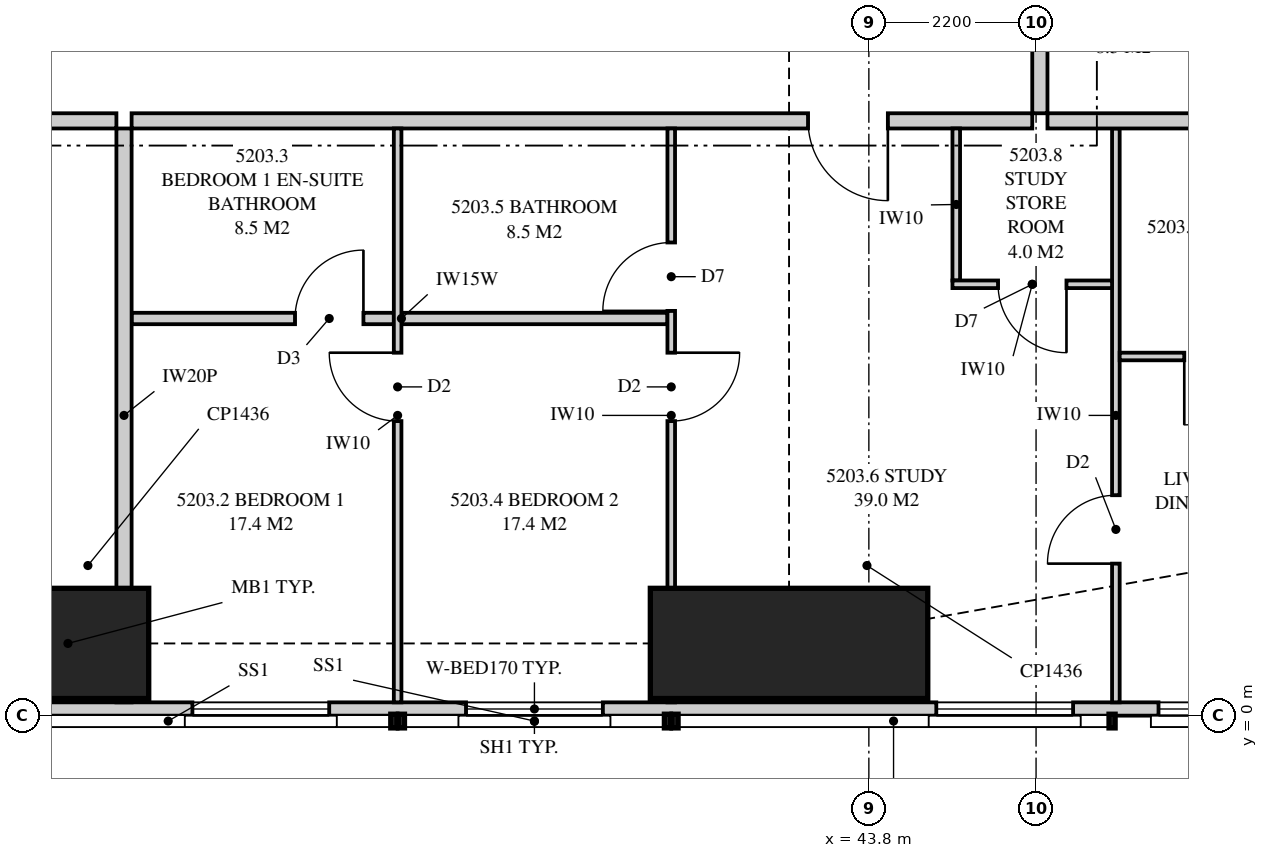
"""IFC4 building model, lengths in metres.
Left out: names, types, materials, properties, quantities, classifications, styles, units other than length and angle.
Written with IfcOpenShell. Run it as: python <this file> out.ifc"""

import sys

from ifc_helpers import new_model, si_unit, direction, frame, frame_2d, origin, origin_2d, place, context, subcontext, project, spatial, polyline, rectangle, outline, extrude, element, fill, save


model = new_model("IFC4")
c1 = context("Model", 3, precision=1e-05, world=origin(), true_north=direction((0.0, 1.0)))
c2 = subcontext(c1, "Body", "Model", "MODEL_VIEW")
j1 = project(units=[si_unit("LENGTHUNIT", "METRE"), si_unit("PLANEANGLEUNIT", "RADIAN")], contexts=[c1])
p1 = place(None, origin())
s1 = spatial("IfcSite", under=j1, at=p1, CompositionType="ELEMENT")
p2 = place(p1, origin())
s2 = spatial("IfcBuilding", under=s1, at=p2, CompositionType="ELEMENT")
p3 = place(p2, frame((0.0, 0.0, 191.2)))
s3 = spatial("IfcBuildingStorey", under=s2, at=p3, CompositionType="ELEMENT", Elevation=191.2)
for number, where, z_axis, x_axis in (
    (1, (32.5, 0.95, 0.0), (0.0, 0.0, 1.0), (0.0, 1.0, 0.0)),
    (2, (42.75, 0.95, 0.0), (0.0, 0.0, 1.0), (0.0, 1.0, 0.0)),
):
    element("IfcColumn", number, at=place(p3, frame(where, z_axis=z_axis, x_axis=x_axis)), inside=s3, PredefinedType="COLUMN", context=c2, shape_type="SweptSolid", body=[
        extrude(rectangle(XDim=1.45, YDim=3.65, at=origin_2d()), origin(), (0.0, 0.0, 1.0), 3.35),
    ])
p4 = place(p3, frame((15.051, 0.087, 0.0), z_axis=(0.0, 0.0, 1.0), x_axis=(1.0, 0.0, 0.0)))
e3 = element("IfcWall", 3, at=p4, inside=s3, PredefinedType="SOLIDWALL", context=c2, shape_type="SweptSolid", body=[
    extrude(outline(polyline([(0.0, 0.0), (34.897, 0.0), (34.897, 3.11), (27.91, 3.11), (27.91, 2.15), (27.836, 2.15), (27.836, 3.11), (27.699, 3.11), (27.699, 2.15), (7.199, 2.15), (7.199, 3.11), (7.062, 3.11), (7.062, 2.15), (6.987, 2.15), (6.987, 3.11), (0.0, 3.11), (0.0, 0.0)])), frame((0.0, 0.087, 0.0), z_axis=(0.0, -1.0, 0.0), x_axis=(1.0, 0.0, 0.0)), (0.0, 0.0, 1.0), 0.175),
])
p5 = place(p4, frame((2.84, 0.0, 0.4)))
e4 = element("IfcOpeningElement", 4, at=p5, cuts=e3, PredefinedType="OPENING", context=c2, shape_type="SweptSolid", body=[
    extrude(rectangle(XDim=2.4, YDim=1.7, at=frame_2d((1.2, 0.85))), frame((0.0, 0.097, 0.0), z_axis=(0.0, -1.0, 0.0), x_axis=(1.0, 0.0, 0.0)), (0.0, 0.0, 1.0), 0.195),
])
p6 = place(p4, frame((9.149, 0.0, 0.4)))
e5 = element("IfcOpeningElement", 5, at=p6, cuts=e3, PredefinedType="OPENING", context=c2, shape_type="SweptSolid", body=[
    extrude(rectangle(XDim=1.8, YDim=1.7, at=frame_2d((0.9, 0.85))), frame((0.0, 0.097, 0.0), z_axis=(0.0, -1.0, 0.0), x_axis=(1.0, 0.0, 0.0)), (0.0, 0.0, 1.0), 0.195),
])
p7 = place(p4, frame((13.561, 0.0, 0.0)))
e6 = element("IfcOpeningElement", 6, at=p7, cuts=e3, PredefinedType="OPENING", context=c2, shape_type="SweptSolid", body=[
    extrude(rectangle(XDim=1.8, YDim=2.1, at=frame_2d((0.9, 1.05))), frame((0.0, 0.097, 0.0), z_axis=(0.0, -1.0, 0.0), x_axis=(1.0, 0.0, 0.0)), (0.0, 0.0, 1.0), 0.195),
])
p8 = place(p4, frame((19.849, 0.0, 0.4)))
e7 = element("IfcOpeningElement", 7, at=p8, cuts=e3, PredefinedType="OPENING", context=c2, shape_type="SweptSolid", body=[
    extrude(rectangle(XDim=1.8, YDim=1.7, at=frame_2d((0.9, 0.85))), frame((0.0, 0.097, 0.0), z_axis=(0.0, -1.0, 0.0), x_axis=(1.0, 0.0, 0.0)), (0.0, 0.0, 1.0), 0.195),
])
p9 = place(p4, frame((23.449, 0.0, 0.4)))
e8 = element("IfcOpeningElement", 8, at=p9, cuts=e3, PredefinedType="OPENING", context=c2, shape_type="SweptSolid", body=[
    extrude(rectangle(XDim=1.8, YDim=1.7, at=frame_2d((0.9, 0.85))), frame((0.0, 0.097, 0.0), z_axis=(0.0, -1.0, 0.0), x_axis=(1.0, 0.0, 0.0)), (0.0, 0.0, 1.0), 0.195),
])
p10 = place(p4, frame((29.636, 0.0, 0.4)))
e9 = element("IfcOpeningElement", 9, at=p10, cuts=e3, PredefinedType="OPENING", context=c2, shape_type="SweptSolid", body=[
    extrude(rectangle(XDim=1.8, YDim=1.7, at=frame_2d((0.9, 0.85))), frame((0.0, 0.097, 0.0), z_axis=(0.0, -1.0, 0.0), x_axis=(1.0, 0.0, 0.0)), (0.0, 0.0, 1.0), 0.195),
])
p11 = place(p4, frame((32.56, 0.0, 0.4)))
e10 = element("IfcOpeningElement", 10, at=p11, cuts=e3, PredefinedType="OPENING", context=c2, shape_type="SweptSolid", body=[
    extrude(rectangle(XDim=1.8, YDim=1.7, at=frame_2d((0.9, 0.85))), frame((0.0, 0.097, 0.0), z_axis=(0.0, -1.0, 0.0), x_axis=(1.0, 0.0, 0.0)), (0.0, 0.0, 1.0), 0.195),
])
p12 = place(p3, frame((34.0, 0.175, 0.0), z_axis=(0.0, 0.0, 1.0), x_axis=(0.0, 1.0, 0.0)))
e11 = element("IfcWall", 11, at=p12, inside=s3, PredefinedType="PARTITIONING", context=c2, shape_type="SweptSolid", body=[
    extrude(outline(polyline([(0.0, 0.0), (7.55, 0.0), (7.55, 3.11), (1.685, 3.11), (1.685, 2.15), (0.0, 2.15), (0.0, 3.11), (0.0, 0.0)])), frame((0.0, 0.1, 0.0), z_axis=(0.0, -1.0, 0.0), x_axis=(1.0, 0.0, 0.0)), (0.0, 0.0, 1.0), 0.2),
])
p13 = place(p3, frame((34.1, 7.825, 0.0), z_axis=(0.0, 0.0, 1.0), x_axis=(1.0, 0.0, 0.0)))
e12 = element("IfcWall", 12, at=p13, inside=s3, PredefinedType="PARTITIONING", context=c2, shape_type="SweptSolid", body=[
    extrude(outline(polyline([(0.0, 0.0), (11.85, 0.0), (11.85, 3.11), (8.987, 3.11), (8.987, 2.541), (8.312, 2.541), (8.312, 3.11), (0.0, 3.11), (0.0, 0.0)])), frame((0.0, 0.1, 0.0), z_axis=(0.0, -1.0, 0.0), x_axis=(1.0, 0.0, 0.0)), (0.0, 0.0, 1.0), 0.2),
])
p14 = place(p13, frame((8.9, 0.0, 0.0)))
e13 = element("IfcOpeningElement", 13, at=p14, cuts=e12, PredefinedType="OPENING", context=c2, shape_type="SweptSolid", body=[
    extrude(rectangle(XDim=1.05, YDim=2.2, at=frame_2d((0.525, 1.1))), frame((0.0, 0.11, 0.0), z_axis=(0.0, -1.0, 0.0), x_axis=(1.0, 0.0, 0.0)), (0.0, 0.0, 1.0), 0.22),
])
p15 = place(p3, frame((37.6, 0.175, 0.0), z_axis=(0.0, 0.0, 1.0), x_axis=(0.0, 1.0, 0.0)))
e14 = element("IfcWall", 14, at=p15, inside=s3, PredefinedType="PARTITIONING", context=c2, shape_type="SweptSolid", body=[
    extrude(outline(polyline([(0.0, 0.0), (7.55, 0.0), (7.55, 3.11), (1.635, 3.11), (1.635, 2.15), (0.0, 2.15), (0.0, 3.11), (0.0, 0.0)])), frame((0.0, 0.05, 0.0), z_axis=(0.0, -1.0, 0.0), x_axis=(1.0, 0.0, 0.0)), (0.0, 0.0, 1.0), 0.1),
])
p16 = place(p15, frame((3.7, 0.0, 0.0)))
e15 = element("IfcOpeningElement", 15, at=p16, cuts=e14, PredefinedType="OPENING", context=c2, shape_type="SweptSolid", body=[
    extrude(rectangle(XDim=0.9, YDim=2.1, at=frame_2d((0.45, 1.05))), frame((0.0, 0.06, 0.0), z_axis=(0.0, -1.0, 0.0), x_axis=(1.0, 0.0, 0.0)), (0.0, 0.0, 1.0), 0.12),
])
p17 = place(p3, frame((41.2, 0.175, 0.0), z_axis=(0.0, 0.0, 1.0), x_axis=(0.0, 1.0, 0.0)))
e16 = element("IfcWall", 16, at=p17, inside=s3, PredefinedType="PARTITIONING", context=c2, shape_type="SweptSolid", body=[
    extrude(outline(polyline([(0.0, 0.0), (7.55, 0.0), (7.55, 3.11), (1.635, 3.11), (1.635, 2.15), (0.0, 2.15), (0.0, 3.11), (0.0, 0.0)])), frame((0.0, 0.05, 0.0), z_axis=(0.0, -1.0, 0.0), x_axis=(1.0, 0.0, 0.0)), (0.0, 0.0, 1.0), 0.1),
])
p18 = place(p17, frame((3.7, 0.0, 0.0)))
e17 = element("IfcOpeningElement", 17, at=p18, cuts=e16, PredefinedType="OPENING", context=c2, shape_type="SweptSolid", body=[
    extrude(rectangle(XDim=0.9, YDim=2.1, at=frame_2d((0.45, 1.05))), frame((0.0, 0.06, 0.0), z_axis=(0.0, -1.0, 0.0), x_axis=(1.0, 0.0, 0.0)), (0.0, 0.0, 1.0), 0.12),
])
p19 = place(p17, frame((5.15, 0.0, 0.0)))
e18 = element("IfcOpeningElement", 18, at=p19, cuts=e16, PredefinedType="OPENING", context=c2, shape_type="SweptSolid", body=[
    extrude(rectangle(XDim=0.9, YDim=2.1, at=frame_2d((0.45, 1.05))), frame((0.0, 0.06, 0.0), z_axis=(0.0, -1.0, 0.0), x_axis=(1.0, 0.0, 0.0)), (0.0, 0.0, 1.0), 0.12),
])
p20 = place(p3, frame((34.1, 5.225, 0.0), z_axis=(0.0, 0.0, 1.0), x_axis=(1.0, 0.0, 0.0)))
e19 = element("IfcWall", 19, at=p20, inside=s3, PredefinedType="PLUMBINGWALL", context=c2, shape_type="SweptSolid", body=[
    extrude(rectangle(XDim=3.45, YDim=0.15, at=frame_2d((1.725, 0.0))), origin(), (0.0, 0.0, 1.0), 3.11),
])
p21 = place(p20, frame((2.15, 0.0, 0.0)))
e20 = element("IfcOpeningElement", 20, at=p21, cuts=e19, PredefinedType="OPENING", context=c2, shape_type="SweptSolid", body=[
    extrude(rectangle(XDim=0.9, YDim=2.1, at=frame_2d((0.45, 1.05))), frame((0.0, 0.085, 0.0), z_axis=(0.0, -1.0, 0.0), x_axis=(1.0, 0.0, 0.0)), (0.0, 0.0, 1.0), 0.17),
])
p22 = place(p3, frame((37.65, 5.225, 0.0), z_axis=(0.0, 0.0, 1.0), x_axis=(1.0, 0.0, 0.0)))
e21 = element("IfcWall", 21, at=p22, inside=s3, PredefinedType="PLUMBINGWALL", context=c2, shape_type="SweptSolid", body=[
    extrude(rectangle(XDim=3.5, YDim=0.15, at=frame_2d((1.75, 0.0))), origin(), (0.0, 0.0, 1.0), 3.11),
])
p23 = place(p3, frame((47.05, 0.175, 0.0), z_axis=(0.0, 0.0, 1.0), x_axis=(0.0, 1.0, 0.0)))
e22 = element("IfcWall", 22, at=p23, inside=s3, PredefinedType="PARTITIONING", context=c2, shape_type="SweptSolid", body=[
    extrude(outline(polyline([(0.0, 0.0), (7.55, 0.0), (7.55, 3.11), (2.409, 3.11), (2.409, 2.15), (0.663, 2.15), (0.663, 3.11), (0.0, 3.11), (0.0, 0.0)])), frame((0.0, 0.05, 0.0), z_axis=(0.0, -1.0, 0.0), x_axis=(1.0, 0.0, 0.0)), (0.0, 0.0, 1.0), 0.1),
])
p24 = place(p23, frame((1.825, 0.0, 0.0)))
e23 = element("IfcOpeningElement", 23, at=p24, cuts=e22, PredefinedType="OPENING", context=c2, shape_type="SweptSolid", body=[
    extrude(rectangle(XDim=0.9, YDim=2.1, at=frame_2d((0.45, 1.05))), frame((0.0, 0.06, 0.0), z_axis=(0.0, -1.0, 0.0), x_axis=(1.0, 0.0, 0.0)), (0.0, 0.0, 1.0), 0.12),
])
p25 = place(p3, frame((47.1, 4.725, 0.0), z_axis=(0.0, 0.0, 1.0), x_axis=(1.0, 0.0, 0.0)))
e24 = element("IfcWall", 24, at=p25, inside=s3, PredefinedType="PARTITIONING", context=c2, shape_type="SweptSolid", body=[
    extrude(rectangle(XDim=2.6, YDim=0.1, at=frame_2d((1.3, 0.0))), origin(), (0.0, 0.0, 1.0), 3.11),
])
p26 = place(p25, frame((0.85, 0.0, 0.0)))
e25 = element("IfcOpeningElement", 25, at=p26, cuts=e24, PredefinedType="OPENING", context=c2, shape_type="SweptSolid", body=[
    extrude(rectangle(XDim=0.9, YDim=2.1, at=frame_2d((0.45, 1.05))), frame((0.0, 0.06, 0.0), z_axis=(0.0, -1.0, 0.0), x_axis=(1.0, 0.0, 0.0)), (0.0, 0.0, 1.0), 0.12),
])
p27 = place(p3, frame((46.15, 7.825, 0.0), z_axis=(0.0, 0.0, 1.0), x_axis=(1.0, 0.0, 0.0)))
e26 = element("IfcWall", 26, at=p27, inside=s3, PredefinedType="PARTITIONING", context=c2, shape_type="SweptSolid", body=[
    extrude(outline(polyline([(0.0, 0.0), (6.85, 0.0), (6.85, 3.11), (6.138, 3.11), (6.138, 2.15), (4.303, 2.15), (4.303, 3.11), (0.0, 3.11), (0.0, 0.0)])), frame((0.0, 0.1, 0.0), z_axis=(0.0, -1.0, 0.0), x_axis=(1.0, 0.0, 0.0)), (0.0, 0.0, 1.0), 0.2),
])
p28 = place(p3, frame((46.05, 7.925, 0.0), z_axis=(0.0, 0.0, 1.0), x_axis=(0.0, 1.0, 0.0)))
e27 = element("IfcWall", 27, at=p28, inside=s3, PredefinedType="PARTITIONING", context=c2, shape_type="SweptSolid", body=[
    extrude(outline(polyline([(0.0, 0.0), (13.775, 0.0), (13.775, 3.11), (5.412, 3.11), (5.412, 2.541), (4.738, 2.541), (4.738, 3.11), (0.0, 3.11), (0.0, 0.0)])), frame((0.0, 0.1, 0.0), z_axis=(0.0, -1.0, 0.0), x_axis=(1.0, 0.0, 0.0)), (0.0, 0.0, 1.0), 0.2),
])
p29 = place(p28, frame((6.387, 0.0, 0.0)))
e28 = element("IfcOpeningElement", 28, at=p29, cuts=e27, PredefinedType="OPENING", context=c2, shape_type="SweptSolid", body=[
    extrude(rectangle(XDim=1.05, YDim=2.2, at=frame_2d((0.525, 1.1))), frame((0.0, 0.11, 0.0), z_axis=(0.0, -1.0, 0.0), x_axis=(1.0, 0.0, 0.0)), (0.0, 0.0, 1.0), 0.22),
])
p30 = place(p3, frame((30.05, 7.825, 0.0), z_axis=(0.0, 0.0, 1.0), x_axis=(1.0, 0.0, 0.0)))
e29 = element("IfcWall", 29, at=p30, inside=s3, PredefinedType="PARTITIONING", context=c2, shape_type="SweptSolid", body=[
    extrude(outline(polyline([(0.0, 0.0), (3.85, 0.0), (3.85, 3.11), (2.787, 3.11), (2.787, 2.541), (2.113, 2.541), (2.113, 3.11), (0.0, 3.11), (0.0, 0.0)])), frame((0.0, 0.1, 0.0), z_axis=(0.0, -1.0, 0.0), x_axis=(1.0, 0.0, 0.0)), (0.0, 0.0, 1.0), 0.2),
])
p31 = place(p3, frame((47.0, 5.675, 0.0), z_axis=(0.0, 0.0, 1.0), x_axis=(-1.0, 0.0, 0.0)))
e30 = element("IfcWall", 30, at=p31, inside=s3, PredefinedType="PARTITIONING", context=c2, shape_type="SweptSolid", body=[
    extrude(rectangle(XDim=2.1, YDim=0.1, at=frame_2d((1.05, 0.0))), origin(), (0.0, 0.0, 1.0), 3.11),
])
p32 = place(p31, frame((0.6, 0.0, 0.0)))
e31 = element("IfcOpeningElement", 31, at=p32, cuts=e30, PredefinedType="OPENING", context=c2, shape_type="SweptSolid", body=[
    extrude(rectangle(XDim=0.9, YDim=2.1, at=frame_2d((0.45, 1.05))), frame((0.0, 0.06, 0.0), z_axis=(0.0, -1.0, 0.0), x_axis=(1.0, 0.0, 0.0)), (0.0, 0.0, 1.0), 0.12),
])
p33 = place(p3, frame((44.95, 7.725, 0.0), z_axis=(0.0, 0.0, 1.0), x_axis=(0.0, -1.0, 0.0)))
e32 = element("IfcWall", 32, at=p33, inside=s3, PredefinedType="PARTITIONING", context=c2, shape_type="SweptSolid", body=[
    extrude(rectangle(XDim=2.0, YDim=0.1, at=frame_2d((1.0, 0.0))), origin(), (0.0, 0.0, 1.0), 3.11),
])
p34 = place(p8, origin())
e33 = element("IfcWindow", 33, at=p34, inside=s3, PartitioningType="SINGLE_PANEL", PredefinedType="WINDOW", context=c2, shape_type="SweptSolid", body=[
    extrude(rectangle(XDim=1.8, YDim=1.7, at=frame_2d((0.9, 0.85))), frame((0.0, 0.03, 0.0), z_axis=(0.0, -1.0, 0.0), x_axis=(1.0, 0.0, 0.0)), (0.0, 0.0, 1.0), 0.06),
])
fill(e7, e33)
p35 = place(p9, origin())
e34 = element("IfcWindow", 34, at=p35, inside=s3, PartitioningType="SINGLE_PANEL", PredefinedType="WINDOW", context=c2, shape_type="SweptSolid", body=[
    extrude(rectangle(XDim=1.8, YDim=1.7, at=frame_2d((0.9, 0.85))), frame((0.0, 0.03, 0.0), z_axis=(0.0, -1.0, 0.0), x_axis=(1.0, 0.0, 0.0)), (0.0, 0.0, 1.0), 0.06),
])
fill(e8, e34)
p36 = place(p10, origin())
e35 = element("IfcWindow", 35, at=p36, inside=s3, PartitioningType="SINGLE_PANEL", PredefinedType="WINDOW", context=c2, shape_type="SweptSolid", body=[
    extrude(rectangle(XDim=1.8, YDim=1.7, at=frame_2d((0.9, 0.85))), frame((0.0, 0.03, 0.0), z_axis=(0.0, -1.0, 0.0), x_axis=(1.0, 0.0, 0.0)), (0.0, 0.0, 1.0), 0.06),
])
fill(e9, e35)
p37 = place(p11, origin())
e36 = element("IfcWindow", 36, at=p37, inside=s3, PartitioningType="SINGLE_PANEL", PredefinedType="WINDOW", context=c2, shape_type="SweptSolid", body=[
    extrude(rectangle(XDim=1.8, YDim=1.7, at=frame_2d((0.9, 0.85))), frame((0.0, 0.03, 0.0), z_axis=(0.0, -1.0, 0.0), x_axis=(1.0, 0.0, 0.0)), (0.0, 0.0, 1.0), 0.06),
])
fill(e10, e36)
p38 = place(p14, frame((1.05, 0.0, 0.0), z_axis=(0.0, 0.0, 1.0), x_axis=(-1.0, 0.0, 0.0)))
e37 = element("IfcDoor", 37, at=p38, inside=s3, OperationType="SINGLE_SWING_LEFT", PredefinedType="DOOR", context=c2, shape_type="SweptSolid", body=[
    extrude(rectangle(XDim=1.05, YDim=2.2, at=frame_2d((0.525, 1.1))), frame((0.0, 0.025, 0.0), z_axis=(0.0, -1.0, 0.0), x_axis=(1.0, 0.0, 0.0)), (0.0, 0.0, 1.0), 0.05),
])
fill(e13, e37)
p39 = place(p16, origin())
e38 = element("IfcDoor", 38, at=p39, inside=s3, OperationType="SINGLE_SWING_RIGHT", PredefinedType="DOOR", context=c2, shape_type="SweptSolid", body=[
    extrude(rectangle(XDim=0.9, YDim=2.1, at=frame_2d((0.45, 1.05))), frame((0.0, 0.025, 0.0), z_axis=(0.0, -1.0, 0.0), x_axis=(1.0, 0.0, 0.0)), (0.0, 0.0, 1.0), 0.05),
])
fill(e15, e38)
p40 = place(p21, origin())
e39 = element("IfcDoor", 39, at=p40, inside=s3, OperationType="SINGLE_SWING_RIGHT", PredefinedType="DOOR", context=c2, shape_type="SweptSolid", body=[
    extrude(rectangle(XDim=0.9, YDim=2.1, at=frame_2d((0.45, 1.05))), frame((0.0, 0.025, 0.0), z_axis=(0.0, -1.0, 0.0), x_axis=(1.0, 0.0, 0.0)), (0.0, 0.0, 1.0), 0.05),
])
fill(e20, e39)
p41 = place(p18, frame((0.9, 0.0, 0.0), z_axis=(0.0, 0.0, 1.0), x_axis=(-1.0, 0.0, 0.0)))
e40 = element("IfcDoor", 40, at=p41, inside=s3, OperationType="SINGLE_SWING_LEFT", PredefinedType="DOOR", context=c2, shape_type="SweptSolid", body=[
    extrude(rectangle(XDim=0.9, YDim=2.1, at=frame_2d((0.45, 1.05))), frame((0.0, 0.025, 0.0), z_axis=(0.0, -1.0, 0.0), x_axis=(1.0, 0.0, 0.0)), (0.0, 0.0, 1.0), 0.05),
])
fill(e17, e40)
p42 = place(p19, origin())
e41 = element("IfcDoor", 41, at=p42, inside=s3, OperationType="SINGLE_SWING_LEFT", PredefinedType="DOOR", context=c2, shape_type="SweptSolid", body=[
    extrude(rectangle(XDim=0.9, YDim=2.1, at=frame_2d((0.45, 1.05))), frame((0.0, 0.025, 0.0), z_axis=(0.0, -1.0, 0.0), x_axis=(1.0, 0.0, 0.0)), (0.0, 0.0, 1.0), 0.05),
])
fill(e18, e41)
p43 = place(p24, origin())
e42 = element("IfcDoor", 42, at=p43, inside=s3, OperationType="SINGLE_SWING_LEFT", PredefinedType="DOOR", context=c2, shape_type="SweptSolid", body=[
    extrude(rectangle(XDim=0.9, YDim=2.1, at=frame_2d((0.45, 1.05))), frame((0.0, 0.025, 0.0), z_axis=(0.0, -1.0, 0.0), x_axis=(1.0, 0.0, 0.0)), (0.0, 0.0, 1.0), 0.05),
])
fill(e23, e42)
p44 = place(p26, frame((0.9, 0.0, 0.0), z_axis=(0.0, 0.0, 1.0), x_axis=(-1.0, 0.0, 0.0)))
e43 = element("IfcDoor", 43, at=p44, inside=s3, OperationType="SINGLE_SWING_RIGHT", PredefinedType="DOOR", context=c2, shape_type="SweptSolid", body=[
    extrude(rectangle(XDim=0.9, YDim=2.1, at=frame_2d((0.45, 1.05))), frame((0.0, 0.025, 0.0), z_axis=(0.0, -1.0, 0.0), x_axis=(1.0, 0.0, 0.0)), (0.0, 0.0, 1.0), 0.05),
])
fill(e25, e43)
p45 = place(p32, origin())
e44 = element("IfcDoor", 44, at=p45, inside=s3, OperationType="SINGLE_SWING_LEFT", PredefinedType="DOOR", context=c2, shape_type="SweptSolid", body=[
    extrude(rectangle(XDim=0.9, YDim=2.1, at=frame_2d((0.45, 1.05))), frame((0.0, 0.025, 0.0), z_axis=(0.0, -1.0, 0.0), x_axis=(1.0, 0.0, 0.0)), (0.0, 0.0, 1.0), 0.05),
])
fill(e31, e44)
save(model, sys.argv[1])
